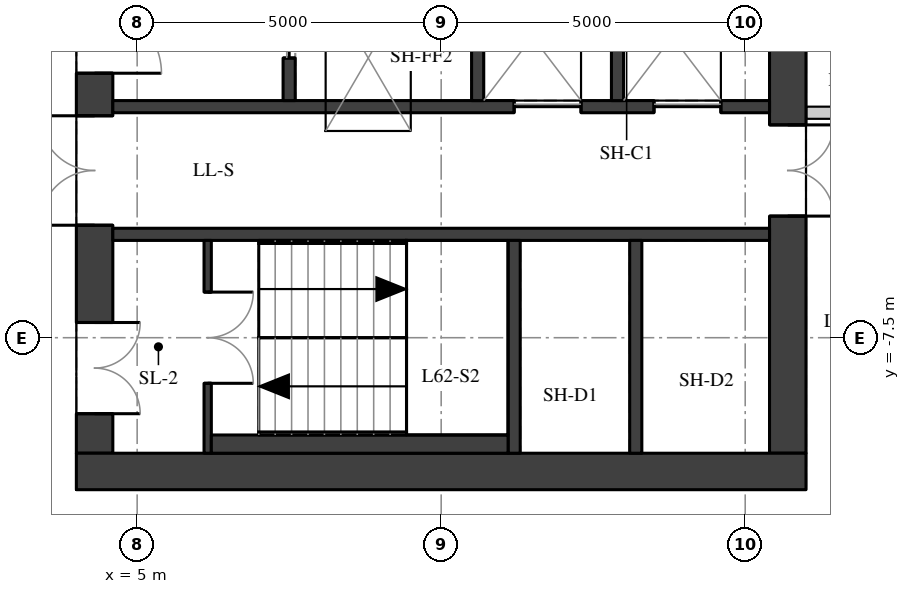
"""IFC4 building model, lengths in metres.
Left out: names, types, materials, properties, quantities, classifications, styles, units other than length and angle.
Written with IfcOpenShell. Run it as: python <this file> out.ifc"""

import sys

from ifc_helpers import new_model, si_unit, direction, frame, frame_2d, origin, place, context, subcontext, project, spatial, rectangle, extrude, element, fill, save


model = new_model("IFC4")
c1 = context("Model", 3, precision=1e-05, world=origin(), true_north=direction((0.0, 1.0)))
c2 = subcontext(c1, "Body", "Model", "MODEL_VIEW")
j1 = project(units=[si_unit("LENGTHUNIT", "METRE"), si_unit("PLANEANGLEUNIT", "RADIAN")], contexts=[c1])
p1 = place(None, origin())
s1 = spatial("IfcSite", under=j1, at=p1, CompositionType="ELEMENT")
p2 = place(p1, origin())
s2 = spatial("IfcBuilding", under=s1, at=p2, CompositionType="ELEMENT")
p3 = place(p2, frame((0.0, 0.0, 218.9)))
s3 = spatial("IfcBuildingStorey", under=s2, at=p3, CompositionType="ELEMENT", Elevation=218.9)
p4 = place(p3, frame((4.3, -9.4, 0.0), z_axis=(0.0, 0.0, 1.0), x_axis=(0.0, 1.0, 0.0)))
e1 = element("IfcWall", 1, at=p4, inside=s3, PredefinedType="SHEAR", context=c2, shape_type="SweptSolid", body=[
    extrude(rectangle(XDim=18.8, YDim=0.6, at=frame_2d((9.4, 0.0))), origin(), (0.0, 0.0, 1.0), 3.02),
])
p5 = place(p4, frame((0.65, 0.0, 0.0)))
e2 = element("IfcOpeningElement", 2, at=p5, cuts=e1, PredefinedType="OPENING", context=c2, shape_type="SweptSolid", body=[
    extrude(rectangle(XDim=1.5, YDim=2.1, at=frame_2d((0.75, 1.05))), frame((0.0, 0.31, 0.0), z_axis=(0.0, -1.0, 0.0), x_axis=(1.0, 0.0, 0.0)), (0.0, 0.0, 1.0), 0.62),
])
p6 = place(p4, frame((3.75, 0.0, 0.0)))
e3 = element("IfcOpeningElement", 3, at=p6, cuts=e1, PredefinedType="OPENING", context=c2, shape_type="SweptSolid", body=[
    extrude(rectangle(XDim=1.8, YDim=2.1, at=frame_2d((0.9, 1.05))), frame((0.0, 0.31, 0.0), z_axis=(0.0, -1.0, 0.0), x_axis=(1.0, 0.0, 0.0)), (0.0, 0.0, 1.0), 0.62),
])
p7 = place(p4, frame((6.25, 0.0, 0.0)))
e4 = element("IfcOpeningElement", 4, at=p7, cuts=e1, PredefinedType="OPENING", context=c2, shape_type="SweptSolid", body=[
    extrude(rectangle(XDim=1.1, YDim=2.1, at=frame_2d((0.55, 1.05))), frame((0.0, 0.31, 0.0), z_axis=(0.0, -1.0, 0.0), x_axis=(1.0, 0.0, 0.0)), (0.0, 0.0, 1.0), 0.62),
])
p8 = place(p4, frame((8.9, 0.0, 0.0)))
e5 = element("IfcOpeningElement", 5, at=p8, cuts=e1, PredefinedType="OPENING", context=c2, shape_type="SweptSolid", body=[
    extrude(rectangle(XDim=1.0, YDim=2.1, at=frame_2d((0.5, 1.05))), frame((0.0, 0.31, 0.0), z_axis=(0.0, -1.0, 0.0), x_axis=(1.0, 0.0, 0.0)), (0.0, 0.0, 1.0), 0.62),
])
p9 = place(p4, frame((11.45, 0.0, 0.0)))
e6 = element("IfcOpeningElement", 6, at=p9, cuts=e1, PredefinedType="OPENING", context=c2, shape_type="SweptSolid", body=[
    extrude(rectangle(XDim=1.1, YDim=2.1, at=frame_2d((0.55, 1.05))), frame((0.0, 0.31, 0.0), z_axis=(0.0, -1.0, 0.0), x_axis=(1.0, 0.0, 0.0)), (0.0, 0.0, 1.0), 0.62),
])
p10 = place(p4, frame((13.25, 0.0, 0.0)))
e7 = element("IfcOpeningElement", 7, at=p10, cuts=e1, PredefinedType="OPENING", context=c2, shape_type="SweptSolid", body=[
    extrude(rectangle(XDim=1.8, YDim=2.1, at=frame_2d((0.9, 1.05))), frame((0.0, 0.31, 0.0), z_axis=(0.0, -1.0, 0.0), x_axis=(1.0, 0.0, 0.0)), (0.0, 0.0, 1.0), 0.62),
])
p11 = place(p4, frame((16.65, 0.0, 0.0)))
e8 = element("IfcOpeningElement", 8, at=p11, cuts=e1, PredefinedType="OPENING", context=c2, shape_type="SweptSolid", body=[
    extrude(rectangle(XDim=1.5, YDim=2.1, at=frame_2d((0.75, 1.05))), frame((0.0, 0.31, 0.0), z_axis=(0.0, -1.0, 0.0), x_axis=(1.0, 0.0, 0.0)), (0.0, 0.0, 1.0), 0.62),
])
p12 = place(p3, frame((15.7, -9.4, 0.0), z_axis=(0.0, 0.0, 1.0), x_axis=(0.0, 1.0, 0.0)))
e9 = element("IfcWall", 9, at=p12, inside=s3, PredefinedType="SHEAR", context=c2, shape_type="SweptSolid", body=[
    extrude(rectangle(XDim=18.8, YDim=0.6, at=frame_2d((9.4, 0.0))), origin(), (0.0, 0.0, 1.0), 3.02),
])
p13 = place(p12, frame((13.4, 0.0, 0.0)))
e10 = element("IfcOpeningElement", 10, at=p13, cuts=e9, PredefinedType="OPENING", context=c2, shape_type="SweptSolid", body=[
    extrude(rectangle(XDim=1.5, YDim=2.1, at=frame_2d((0.75, 1.05))), frame((0.0, 0.31, 0.0), z_axis=(0.0, -1.0, 0.0), x_axis=(1.0, 0.0, 0.0)), (0.0, 0.0, 1.0), 0.62),
])
p14 = place(p12, frame((3.9, 0.0, 0.0)))
e11 = element("IfcOpeningElement", 11, at=p14, cuts=e9, PredefinedType="OPENING", context=c2, shape_type="SweptSolid", body=[
    extrude(rectangle(XDim=1.5, YDim=2.1, at=frame_2d((0.75, 1.05))), frame((0.0, 0.31, 0.0), z_axis=(0.0, -1.0, 0.0), x_axis=(1.0, 0.0, 0.0)), (0.0, 0.0, 1.0), 0.62),
])
p15 = place(p3, frame((4.0, -9.7, 0.0), z_axis=(0.0, 0.0, 1.0), x_axis=(1.0, 0.0, 0.0)))
e12 = element("IfcWall", 12, at=p15, inside=s3, PredefinedType="SHEAR", context=c2, shape_type="SweptSolid", body=[
    extrude(rectangle(XDim=12.0, YDim=0.6, at=frame_2d((6.0, 0.0))), origin(), (0.0, 0.0, 1.0), 3.02),
])
p16 = place(p3, frame((4.6, -3.7, 0.0), z_axis=(0.0, 0.0, 1.0), x_axis=(1.0, 0.0, 0.0)))
e13 = element("IfcWall", 13, at=p16, inside=s3, PredefinedType="SHEAR", context=c2, shape_type="SweptSolid", body=[
    extrude(rectangle(XDim=10.8, YDim=0.2, at=frame_2d((5.4, 0.0))), origin(), (0.0, 0.0, 1.0), 3.02),
])
p17 = place(p16, frame((6.6, 0.0, 0.0)))
e14 = element("IfcOpeningElement", 14, at=p17, cuts=e13, PredefinedType="OPENING", context=c2, shape_type="SweptSolid", body=[
    extrude(rectangle(XDim=1.1, YDim=2.1, at=frame_2d((0.55, 1.05))), frame((0.0, 0.11, 0.0), z_axis=(0.0, -1.0, 0.0), x_axis=(1.0, 0.0, 0.0)), (0.0, 0.0, 1.0), 0.22),
])
p18 = place(p16, frame((8.9, 0.0, 0.0)))
e15 = element("IfcOpeningElement", 15, at=p18, cuts=e13, PredefinedType="OPENING", context=c2, shape_type="SweptSolid", body=[
    extrude(rectangle(XDim=1.1, YDim=2.1, at=frame_2d((0.55, 1.05))), frame((0.0, 0.11, 0.0), z_axis=(0.0, -1.0, 0.0), x_axis=(1.0, 0.0, 0.0)), (0.0, 0.0, 1.0), 0.22),
])
p19 = place(p3, frame((4.6, -5.8, 0.0), z_axis=(0.0, 0.0, 1.0), x_axis=(1.0, 0.0, 0.0)))
e16 = element("IfcWall", 16, at=p19, inside=s3, PredefinedType="SHEAR", context=c2, shape_type="SweptSolid", body=[
    extrude(rectangle(XDim=10.8, YDim=0.2, at=frame_2d((5.4, 0.0))), origin(), (0.0, 0.0, 1.0), 3.02),
])
for number, where, z_axis, x_axis in (
    (17, (11.2, -9.4, 0.0), (0.0, 0.0, 1.0), (0.0, 1.0, 0.0)),
    (18, (13.2, -9.4, 0.0), (0.0, 0.0, 1.0), (0.0, 1.0, 0.0)),
):
    element("IfcWall", number, at=place(p3, frame(where, z_axis=z_axis, x_axis=x_axis)), inside=s3, PredefinedType="SHEAR", context=c2, shape_type="SweptSolid", body=[
        extrude(rectangle(XDim=3.5, YDim=0.2, at=frame_2d((1.75, 0.0))), origin(), (0.0, 0.0, 1.0), 3.02),
    ])
p20 = place(p3, frame((7.5, -3.6, 0.0), z_axis=(0.0, 0.0, 1.0), x_axis=(0.0, 1.0, 0.0)))
e19 = element("IfcWall", 19, at=p20, inside=s3, PredefinedType="SHEAR", context=c2, shape_type="SweptSolid", body=[
    extrude(rectangle(XDim=2.5, YDim=0.2, at=frame_2d((1.25, 0.0))), origin(), (0.0, 0.0, 1.0), 3.02),
])
p21 = place(p20, frame((0.7, 0.0, 0.0)))
e20 = element("IfcOpeningElement", 20, at=p21, cuts=e19, PredefinedType="OPENING", context=c2, shape_type="SweptSolid", body=[
    extrude(rectangle(XDim=1.1, YDim=2.1, at=frame_2d((0.55, 1.05))), frame((0.0, 0.11, 0.0), z_axis=(0.0, -1.0, 0.0), x_axis=(1.0, 0.0, 0.0)), (0.0, 0.0, 1.0), 0.22),
])
for number, where, z_axis, x_axis in (
    (21, (10.6, -3.6, 0.0), (0.0, 0.0, 1.0), (0.0, 1.0, 0.0)),
    (22, (12.9, -3.6, 0.0), (0.0, 0.0, 1.0), (0.0, 1.0, 0.0)),
):
    element("IfcWall", number, at=place(p3, frame(where, z_axis=z_axis, x_axis=x_axis)), inside=s3, PredefinedType="SHEAR", context=c2, shape_type="SweptSolid", body=[
        extrude(rectangle(XDim=2.5, YDim=0.2, at=frame_2d((1.25, 0.0))), origin(), (0.0, 0.0, 1.0), 3.02),
    ])
p22 = place(p3, frame((6.16, -9.4, 0.0), z_axis=(0.0, 0.0, 1.0), x_axis=(0.0, 1.0, 0.0)))
e23 = element("IfcWall", 23, at=p22, inside=s3, PredefinedType="SHEAR", context=c2, shape_type="SweptSolid", body=[
    extrude(rectangle(XDim=3.5, YDim=0.12, at=frame_2d((1.75, 0.0))), origin(), (0.0, 0.0, 1.0), 3.02),
])
p23 = place(p22, frame((1.15, 0.0, 0.0)))
e24 = element("IfcOpeningElement", 24, at=p23, cuts=e23, PredefinedType="OPENING", context=c2, shape_type="SweptSolid", body=[
    extrude(rectangle(XDim=1.5, YDim=2.1, at=frame_2d((0.75, 1.05))), frame((0.0, 0.07, 0.0), z_axis=(0.0, -1.0, 0.0), x_axis=(1.0, 0.0, 0.0)), (0.0, 0.0, 1.0), 0.14),
])
p24 = place(p3, frame((6.22, -9.25, 0.0), z_axis=(0.0, 0.0, 1.0), x_axis=(1.0, 0.0, 0.0)))
e25 = element("IfcWall", 25, at=p24, inside=s3, PredefinedType="PARTITIONING", context=c2, shape_type="SweptSolid", body=[
    extrude(rectangle(XDim=4.88, YDim=0.3, at=frame_2d((2.44, 0.0))), origin(), (0.0, 0.0, 1.0), 3.02),
])
p25 = place(p3, frame((16.004, -3.8, 0.0), z_axis=(0.0, 0.0, 1.0), x_axis=(1.0, 0.0, 0.0)))
e26 = element("IfcWall", 26, at=p25, inside=s3, PredefinedType="PARTITIONING", context=c2, shape_type="SweptSolid", body=[
    extrude(rectangle(XDim=1.596, YDim=0.2, at=frame_2d((0.798, 0.0))), origin(), (0.0, 0.0, 1.0), 2.47),
])
p26 = place(p5, origin())
e27 = element("IfcDoor", 27, at=p26, inside=s3, OperationType="DOUBLE_DOOR_SINGLE_SWING", PredefinedType="DOOR", context=c2, shape_type="SweptSolid", body=[
    extrude(rectangle(XDim=1.5, YDim=2.1, at=frame_2d((0.75, 1.05))), frame((0.0, 0.025, 0.0), z_axis=(0.0, -1.0, 0.0), x_axis=(1.0, 0.0, 0.0)), (0.0, 0.0, 1.0), 0.05),
])
fill(e2, e27)
p27 = place(p6, origin())
e28 = element("IfcDoor", 28, at=p27, inside=s3, OperationType="DOUBLE_DOOR_SINGLE_SWING", PredefinedType="DOOR", context=c2, shape_type="SweptSolid", body=[
    extrude(rectangle(XDim=1.8, YDim=2.1, at=frame_2d((0.9, 1.05))), frame((0.0, 0.025, 0.0), z_axis=(0.0, -1.0, 0.0), x_axis=(1.0, 0.0, 0.0)), (0.0, 0.0, 1.0), 0.05),
])
fill(e3, e28)
p28 = place(p7, origin())
e29 = element("IfcDoor", 29, at=p28, inside=s3, OperationType="SINGLE_SWING_RIGHT", PredefinedType="DOOR", context=c2, shape_type="SweptSolid", body=[
    extrude(rectangle(XDim=1.1, YDim=2.1, at=frame_2d((0.55, 1.05))), frame((0.0, 0.025, 0.0), z_axis=(0.0, -1.0, 0.0), x_axis=(1.0, 0.0, 0.0)), (0.0, 0.0, 1.0), 0.05),
])
fill(e4, e29)
p29 = place(p14, origin())
e30 = element("IfcDoor", 30, at=p29, inside=s3, OperationType="DOUBLE_DOOR_SINGLE_SWING", PredefinedType="DOOR", context=c2, shape_type="SweptSolid", body=[
    extrude(rectangle(XDim=1.5, YDim=2.1, at=frame_2d((0.75, 1.05))), frame((0.0, 0.025, 0.0), z_axis=(0.0, -1.0, 0.0), x_axis=(1.0, 0.0, 0.0)), (0.0, 0.0, 1.0), 0.05),
])
fill(e11, e30)
p30 = place(p23, origin())
e31 = element("IfcDoor", 31, at=p30, inside=s3, OperationType="DOUBLE_DOOR_SINGLE_SWING", PredefinedType="DOOR", context=c2, shape_type="SweptSolid", body=[
    extrude(rectangle(XDim=1.5, YDim=2.1, at=frame_2d((0.75, 1.05))), frame((0.0, 0.025, 0.0), z_axis=(0.0, -1.0, 0.0), x_axis=(1.0, 0.0, 0.0)), (0.0, 0.0, 1.0), 0.05),
])
fill(e24, e31)
p31 = place(p17, origin())
e32 = element("IfcDoor", 32, at=p31, inside=s3, OperationType="DOUBLE_DOOR_SLIDING", PredefinedType="DOOR", context=c2, shape_type="SweptSolid", body=[
    extrude(rectangle(XDim=1.1, YDim=2.1, at=frame_2d((0.55, 1.05))), frame((0.0, 0.025, 0.0), z_axis=(0.0, -1.0, 0.0), x_axis=(1.0, 0.0, 0.0)), (0.0, 0.0, 1.0), 0.05),
])
fill(e14, e32)
p32 = place(p18, origin())
e33 = element("IfcDoor", 33, at=p32, inside=s3, OperationType="DOUBLE_DOOR_SLIDING", PredefinedType="DOOR", context=c2, shape_type="SweptSolid", body=[
    extrude(rectangle(XDim=1.1, YDim=2.1, at=frame_2d((0.55, 1.05))), frame((0.0, 0.025, 0.0), z_axis=(0.0, -1.0, 0.0), x_axis=(1.0, 0.0, 0.0)), (0.0, 0.0, 1.0), 0.05),
])
fill(e15, e33)
p33 = place(p21, origin())
e34 = element("IfcDoor", 34, at=p33, inside=s3, OperationType="DOUBLE_DOOR_SLIDING", PredefinedType="DOOR", context=c2, shape_type="SweptSolid", body=[
    extrude(rectangle(XDim=1.1, YDim=2.1, at=frame_2d((0.55, 1.05))), frame((0.0, 0.025, 0.0), z_axis=(0.0, -1.0, 0.0), x_axis=(1.0, 0.0, 0.0)), (0.0, 0.0, 1.0), 0.05),
])
fill(e20, e34)
save(model, sys.argv[1])
